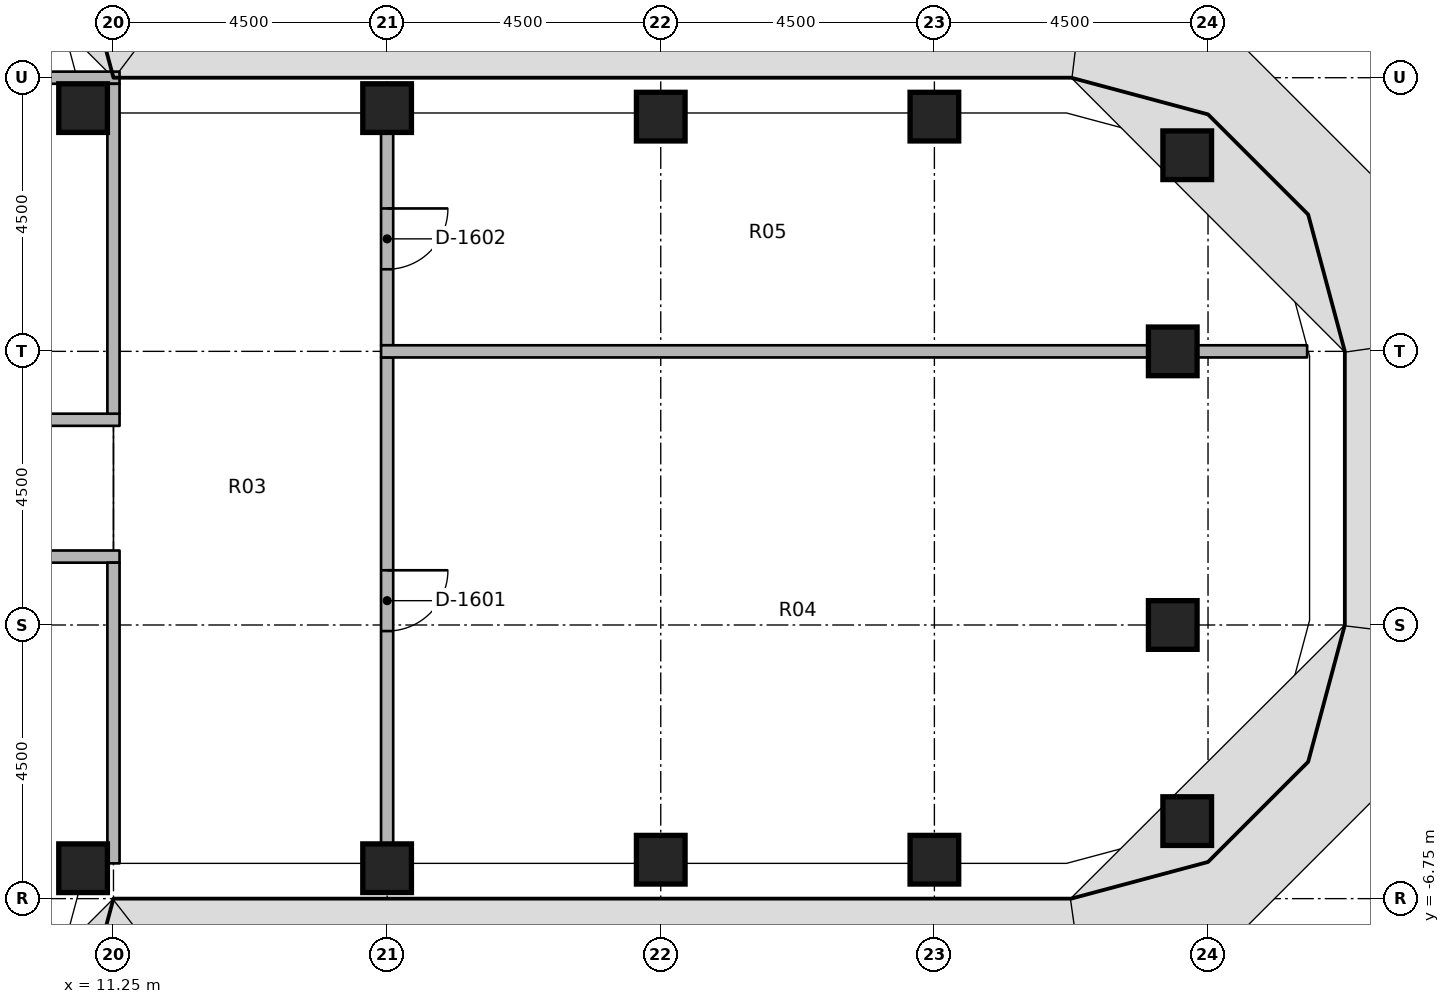
"""IFC4 building model, lengths in metres.
Left out: names, types, materials, properties, quantities, classifications, styles, units other than length and angle.
Written with IfcOpenShell. Run it as: python <this file> out.ifc"""

import sys

from ifc_helpers import new_model, si_unit, direction, frame, frame_2d, origin, origin_2d, place, context, subcontext, project, spatial, rectangle, extrude, element, fill, save


model = new_model("IFC4")
c1 = context("Model", 3, precision=1e-05, world=origin(), true_north=direction((0.0, 1.0)))
c2 = subcontext(c1, "Body", "Model", "MODEL_VIEW")
j1 = project(units=[si_unit("LENGTHUNIT", "METRE"), si_unit("PLANEANGLEUNIT", "RADIAN")], contexts=[c1])
p1 = place(None, origin())
s1 = spatial("IfcSite", under=j1, at=p1, CompositionType="ELEMENT")
p2 = place(p1, origin())
s2 = spatial("IfcBuilding", under=s1, at=p2, CompositionType="ELEMENT")
p3 = place(p2, frame((0.0, 0.0, 156.2)))
s3 = spatial("IfcBuildingStorey", under=s2, at=p3, CompositionType="ELEMENT", Elevation=156.2)
for number, where, z_axis, x_axis in (
    (1, (10.75, -6.25, 0.0), (0.0, 0.0, 1.0), (1.0, 0.0, 0.0)),
    (2, (10.75, 6.25, 0.0), (0.0, 0.0, 1.0), (1.0, 0.0, 0.0)),
    (3, (15.75, -6.25, 0.0), (0.0, 0.0, 1.0), (1.0, 0.0, 0.0)),
    (4, (15.75, 6.25, 0.0), (0.0, 0.0, 1.0), (1.0, 0.0, 0.0)),
    (5, (20.25, -6.11, 0.0), (0.0, 0.0, 1.0), (1.0, 0.0, 0.0)),
    (6, (20.25, 6.11, 0.0), (0.0, 0.0, 1.0), (1.0, 0.0, 0.0)),
    (7, (24.75, -6.11, 0.0), (0.0, 0.0, 1.0), (1.0, 0.0, 0.0)),
    (8, (24.75, 6.11, 0.0), (0.0, 0.0, 1.0), (1.0, 0.0, 0.0)),
    (9, (28.908, -5.475, 0.0), (0.0, 0.0, 1.0), (1.0, 0.0, 0.0)),
    (10, (28.67, -2.25, 0.0), (0.0, 0.0, 1.0), (1.0, 0.0, 0.0)),
    (11, (28.67, 2.25, 0.0), (0.0, 0.0, 1.0), (1.0, 0.0, 0.0)),
    (12, (28.908, 5.475, 0.0), (0.0, 0.0, 1.0), (1.0, 0.0, 0.0)),
):
    element("IfcColumn", number, at=place(p3, frame(where, z_axis=z_axis, x_axis=x_axis)), inside=s3, PredefinedType="COLUMN", context=c2, shape_type="SweptSolid", body=[
        extrude(rectangle(XDim=0.8, YDim=0.8, at=origin_2d()), origin(), (0.0, 0.0, 1.0), 3.65),
    ])
p4 = place(p3, frame((6.65, 1.125, 0.0), z_axis=(0.0, 0.0, 1.0), x_axis=(1.0, 0.0, 0.0)))
e13 = element("IfcWall", 13, at=p4, inside=s3, PredefinedType="PARTITIONING", context=c2, shape_type="SweptSolid", body=[
    extrude(rectangle(XDim=4.7, YDim=0.2, at=frame_2d((2.35, 0.0))), origin(), (0.0, 0.0, 1.0), 2.75),
])
p5 = place(p4, frame((1.85, 0.0, 0.0)))
e14 = element("IfcOpeningElement", 14, at=p5, cuts=e13, PredefinedType="OPENING", context=c2, shape_type="SweptSolid", body=[
    extrude(rectangle(XDim=1.0, YDim=2.1, at=frame_2d((0.5, 1.05))), frame((0.0, 0.11, 0.0), z_axis=(0.0, -1.0, 0.0), x_axis=(1.0, 0.0, 0.0)), (0.0, 0.0, 1.0), 0.22),
])
p6 = place(p3, frame((11.35, -1.125, 0.0), z_axis=(0.0, 0.0, 1.0), x_axis=(-1.0, 0.0, 0.0)))
e15 = element("IfcWall", 15, at=p6, inside=s3, PredefinedType="PARTITIONING", context=c2, shape_type="SweptSolid", body=[
    extrude(rectangle(XDim=4.7, YDim=0.2, at=frame_2d((2.35, 0.0))), origin(), (0.0, 0.0, 1.0), 2.75),
])
p7 = place(p6, frame((1.85, 0.0, 0.0)))
e16 = element("IfcOpeningElement", 16, at=p7, cuts=e15, PredefinedType="OPENING", context=c2, shape_type="SweptSolid", body=[
    extrude(rectangle(XDim=1.0, YDim=2.1, at=frame_2d((0.5, 1.05))), frame((0.0, 0.11, 0.0), z_axis=(0.0, -1.0, 0.0), x_axis=(1.0, 0.0, 0.0)), (0.0, 0.0, 1.0), 0.22),
])
p8 = place(p3, frame((6.65, 6.75, 0.0), z_axis=(0.0, 0.0, 1.0), x_axis=(1.0, 0.0, 0.0)))
e17 = element("IfcWall", 17, at=p8, inside=s3, PredefinedType="PARTITIONING", context=c2, shape_type="SweptSolid", body=[
    extrude(rectangle(XDim=4.7, YDim=0.2, at=frame_2d((2.35, 0.0))), origin(), (0.0, 0.0, 1.0), 2.75),
])
p9 = place(p3, frame((11.25, 1.225, 0.0), z_axis=(0.0, 0.0, 1.0), x_axis=(0.0, 1.0, 0.0)))
e18 = element("IfcWall", 18, at=p9, inside=s3, PredefinedType="PARTITIONING", context=c2, shape_type="SweptSolid", body=[
    extrude(rectangle(XDim=5.425, YDim=0.2, at=frame_2d((2.712, 0.0))), origin(), (0.0, 0.0, 1.0), 2.75),
])
p10 = place(p3, frame((11.25, -6.17, 0.0), z_axis=(0.0, 0.0, 1.0), x_axis=(0.0, 1.0, 0.0)))
e19 = element("IfcWall", 19, at=p10, inside=s3, PredefinedType="PARTITIONING", context=c2, shape_type="SweptSolid", body=[
    extrude(rectangle(XDim=4.945, YDim=0.2, at=frame_2d((2.472, 0.0))), origin(), (0.0, 0.0, 1.0), 2.75),
])
p11 = place(p3, frame((15.75, 2.15, 0.0), z_axis=(0.0, 0.0, 1.0), x_axis=(0.0, -1.0, 0.0)))
e20 = element("IfcWall", 20, at=p11, inside=s3, PredefinedType="PARTITIONING", context=c2, shape_type="SweptSolid", body=[
    extrude(rectangle(XDim=8.0, YDim=0.2, at=frame_2d((4.0, 0.0))), origin(), (0.0, 0.0, 1.0), 2.75),
])
p12 = place(p11, frame((3.5, 0.0, 0.0)))
e21 = element("IfcOpeningElement", 21, at=p12, cuts=e20, PredefinedType="OPENING", context=c2, shape_type="SweptSolid", body=[
    extrude(rectangle(XDim=1.0, YDim=2.1, at=frame_2d((0.5, 1.05))), frame((0.0, 0.11, 0.0), z_axis=(0.0, -1.0, 0.0), x_axis=(1.0, 0.0, 0.0)), (0.0, 0.0, 1.0), 0.22),
])
p13 = place(p3, frame((15.75, 5.85, 0.0), z_axis=(0.0, 0.0, 1.0), x_axis=(0.0, -1.0, 0.0)))
e22 = element("IfcWall", 22, at=p13, inside=s3, PredefinedType="PARTITIONING", context=c2, shape_type="SweptSolid", body=[
    extrude(rectangle(XDim=3.5, YDim=0.2, at=frame_2d((1.75, 0.0))), origin(), (0.0, 0.0, 1.0), 2.75),
])
p14 = place(p13, frame((1.25, 0.0, 0.0)))
e23 = element("IfcOpeningElement", 23, at=p14, cuts=e22, PredefinedType="OPENING", context=c2, shape_type="SweptSolid", body=[
    extrude(rectangle(XDim=1.0, YDim=2.1, at=frame_2d((0.5, 1.05))), frame((0.0, 0.11, 0.0), z_axis=(0.0, -1.0, 0.0), x_axis=(1.0, 0.0, 0.0)), (0.0, 0.0, 1.0), 0.22),
])
p15 = place(p3, frame((15.65, 2.25, 0.0), z_axis=(0.0, 0.0, 1.0), x_axis=(1.0, 0.0, 0.0)))
e24 = element("IfcWall", 24, at=p15, inside=s3, PredefinedType="PARTITIONING", context=c2, shape_type="SweptSolid", body=[
    extrude(rectangle(XDim=12.62, YDim=0.2, at=frame_2d((6.31, 0.0))), origin(), (0.0, 0.0, 1.0), 2.75),
])
p16 = place(p3, frame((29.07, 2.25, 0.0), z_axis=(0.0, 0.0, 1.0), x_axis=(1.0, 0.0, 0.0)))
e25 = element("IfcWall", 25, at=p16, inside=s3, PredefinedType="PARTITIONING", context=c2, shape_type="SweptSolid", body=[
    extrude(rectangle(XDim=1.81, YDim=0.2, at=frame_2d((0.905, 0.0))), origin(), (0.0, 0.0, 1.0), 2.75),
])
p17 = place(p12, origin())
e26 = element("IfcDoor", 26, at=p17, inside=s3, OperationType="SINGLE_SWING_RIGHT", PredefinedType="DOOR", context=c2, shape_type="SweptSolid", body=[
    extrude(rectangle(XDim=1.0, YDim=2.1, at=frame_2d((0.5, 1.05))), frame((0.0, 0.025, 0.0), z_axis=(0.0, -1.0, 0.0), x_axis=(1.0, 0.0, 0.0)), (0.0, 0.0, 1.0), 0.05),
])
fill(e21, e26)
p18 = place(p14, origin())
e27 = element("IfcDoor", 27, at=p18, inside=s3, OperationType="SINGLE_SWING_RIGHT", PredefinedType="DOOR", context=c2, shape_type="SweptSolid", body=[
    extrude(rectangle(XDim=1.0, YDim=2.1, at=frame_2d((0.5, 1.05))), frame((0.0, 0.025, 0.0), z_axis=(0.0, -1.0, 0.0), x_axis=(1.0, 0.0, 0.0)), (0.0, 0.0, 1.0), 0.05),
])
fill(e23, e27)
save(model, sys.argv[1])
